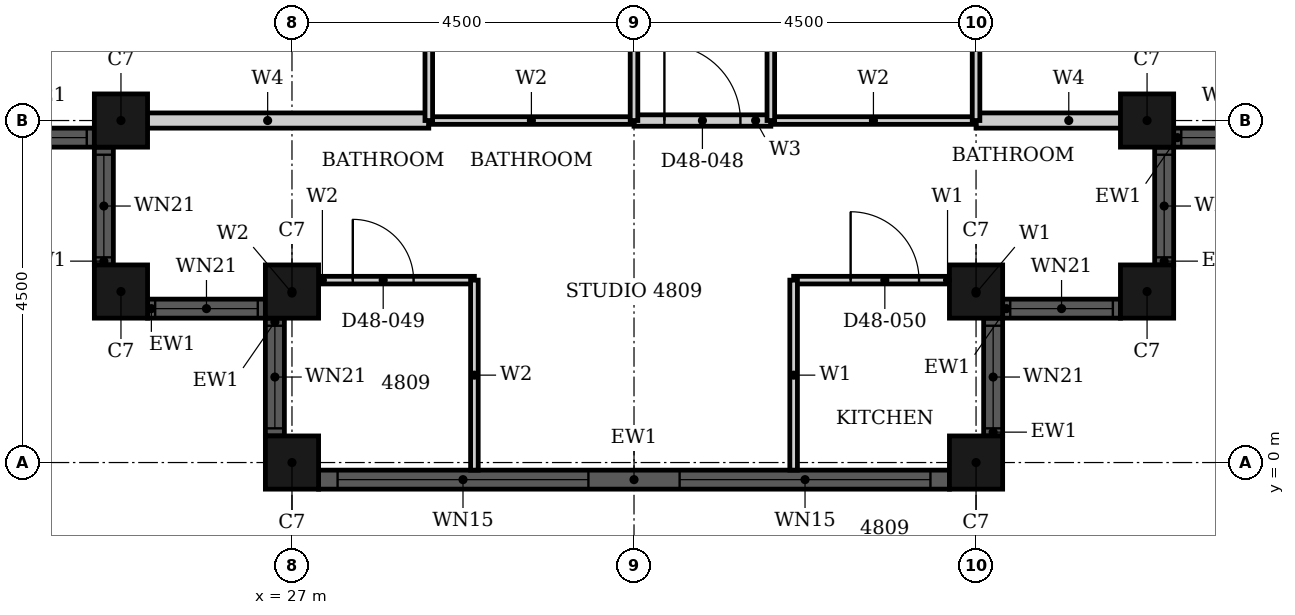
"""IFC4 building model, lengths in metres.
Left out: names, types, materials, properties, quantities, classifications, styles, units other than length and angle.
Written with IfcOpenShell. Run it as: python <this file> out.ifc"""

import sys

from ifc_helpers import new_model, si_unit, direction, frame, frame_2d, origin, origin_2d, place, context, subcontext, project, spatial, rectangle, hollow_rectangle, extrude, element, fill, save


model = new_model("IFC4")
c1 = context("Model", 3, precision=1e-05, world=origin(), true_north=direction((0.0, 1.0)))
c2 = subcontext(c1, "Body", "Model", "MODEL_VIEW")
j1 = project(units=[si_unit("LENGTHUNIT", "METRE"), si_unit("PLANEANGLEUNIT", "RADIAN")], contexts=[c1])
p1 = place(None, origin())
s1 = spatial("IfcSite", under=j1, at=p1, CompositionType="ELEMENT")
p2 = place(p1, origin())
s2 = spatial("IfcBuilding", under=s1, at=p2, CompositionType="ELEMENT")
p3 = place(p2, frame((0.0, 0.0, 192.4)))
s3 = spatial("IfcBuildingStorey", under=s2, at=p3, CompositionType="ELEMENT", Elevation=192.4)
for number, where, z_axis, x_axis in (
    (1, (24.75, 4.5, 0.0), (0.0, 0.0, 1.0), (1.0, 0.0, 0.0)),
    (2, (24.75, 2.25, 0.0), (0.0, 0.0, 1.0), (1.0, 0.0, 0.0)),
    (3, (27.0, 2.25, 0.0), (0.0, 0.0, 1.0), (1.0, 0.0, 0.0)),
    (4, (27.0, 0.0, 0.0), (0.0, 0.0, 1.0), (1.0, 0.0, 0.0)),
    (5, (36.0, 0.0, 0.0), (0.0, 0.0, 1.0), (1.0, 0.0, 0.0)),
    (6, (36.0, 2.25, 0.0), (0.0, 0.0, 1.0), (1.0, 0.0, 0.0)),
    (7, (38.25, 2.25, 0.0), (0.0, 0.0, 1.0), (1.0, 0.0, 0.0)),
    (8, (38.25, 4.5, 0.0), (0.0, 0.0, 1.0), (1.0, 0.0, 0.0)),
):
    element("IfcColumn", number, at=place(p3, frame(where, z_axis=z_axis, x_axis=x_axis)), inside=s3, PredefinedType="COLUMN", context=c2, shape_type="SweptSolid", body=[
        extrude(hollow_rectangle(XDim=0.7, YDim=0.7, WallThickness=0.022, at=origin_2d()), origin(), (0.0, 0.0, 1.0), 3.7),
    ])
p4 = place(p3, frame((22.85, 4.275, 0.0), z_axis=(0.0, 0.0, 1.0), x_axis=(1.0, 0.0, 0.0)))
e9 = element("IfcWall", 9, at=p4, inside=s3, PredefinedType="SOLIDWALL", context=c2, shape_type="SweptSolid", body=[
    extrude(rectangle(XDim=1.55, YDim=0.25, at=frame_2d((0.775, 0.0))), origin(), (0.0, 0.0, 1.0), 3.7),
])
p5 = place(p4, frame((0.1, 0.0, 0.9)))
e10 = element("IfcOpeningElement", 10, at=p5, cuts=e9, PredefinedType="OPENING", context=c2, shape_type="SweptSolid", body=[
    extrude(rectangle(XDim=1.35, YDim=1.85, at=frame_2d((0.675, 0.925))), frame((0.0, 0.135, 0.0), z_axis=(0.0, -1.0, 0.0), x_axis=(1.0, 0.0, 0.0)), (0.0, 0.0, 1.0), 0.27),
])
p6 = place(p3, frame((24.525, 4.15, 0.0), z_axis=(0.0, 0.0, 1.0), x_axis=(0.0, -1.0, 0.0)))
e11 = element("IfcWall", 11, at=p6, inside=s3, PredefinedType="SOLIDWALL", context=c2, shape_type="SweptSolid", body=[
    extrude(rectangle(XDim=1.55, YDim=0.25, at=frame_2d((0.775, 0.0))), origin(), (0.0, 0.0, 1.0), 3.7),
])
p7 = place(p6, frame((0.1, 0.0, 0.9)))
e12 = element("IfcOpeningElement", 12, at=p7, cuts=e11, PredefinedType="OPENING", context=c2, shape_type="SweptSolid", body=[
    extrude(rectangle(XDim=1.35, YDim=1.85, at=frame_2d((0.675, 0.925))), frame((0.0, 0.135, 0.0), z_axis=(0.0, -1.0, 0.0), x_axis=(1.0, 0.0, 0.0)), (0.0, 0.0, 1.0), 0.27),
])
p8 = place(p3, frame((25.1, 2.025, 0.0), z_axis=(0.0, 0.0, 1.0), x_axis=(1.0, 0.0, 0.0)))
e13 = element("IfcWall", 13, at=p8, inside=s3, PredefinedType="SOLIDWALL", context=c2, shape_type="SweptSolid", body=[
    extrude(rectangle(XDim=1.55, YDim=0.25, at=frame_2d((0.775, 0.0))), origin(), (0.0, 0.0, 1.0), 3.7),
])
p9 = place(p8, frame((0.1, 0.0, 0.9)))
e14 = element("IfcOpeningElement", 14, at=p9, cuts=e13, PredefinedType="OPENING", context=c2, shape_type="SweptSolid", body=[
    extrude(rectangle(XDim=1.35, YDim=1.85, at=frame_2d((0.675, 0.925))), frame((0.0, 0.135, 0.0), z_axis=(0.0, -1.0, 0.0), x_axis=(1.0, 0.0, 0.0)), (0.0, 0.0, 1.0), 0.27),
])
p10 = place(p3, frame((26.775, 1.9, 0.0), z_axis=(0.0, 0.0, 1.0), x_axis=(0.0, -1.0, 0.0)))
e15 = element("IfcWall", 15, at=p10, inside=s3, PredefinedType="SOLIDWALL", context=c2, shape_type="SweptSolid", body=[
    extrude(rectangle(XDim=1.55, YDim=0.25, at=frame_2d((0.775, 0.0))), origin(), (0.0, 0.0, 1.0), 3.7),
])
p11 = place(p10, frame((0.1, 0.0, 0.9)))
e16 = element("IfcOpeningElement", 16, at=p11, cuts=e15, PredefinedType="OPENING", context=c2, shape_type="SweptSolid", body=[
    extrude(rectangle(XDim=1.35, YDim=1.85, at=frame_2d((0.675, 0.925))), frame((0.0, 0.135, 0.0), z_axis=(0.0, -1.0, 0.0), x_axis=(1.0, 0.0, 0.0)), (0.0, 0.0, 1.0), 0.27),
])
p12 = place(p3, frame((27.35, -0.225, 0.0), z_axis=(0.0, 0.0, 1.0), x_axis=(1.0, 0.0, 0.0)))
e17 = element("IfcWall", 17, at=p12, inside=s3, PredefinedType="SOLIDWALL", context=c2, shape_type="SweptSolid", body=[
    extrude(rectangle(XDim=8.3, YDim=0.25, at=frame_2d((4.15, 0.0))), origin(), (0.0, 0.0, 1.0), 3.7),
])
p13 = place(p12, frame((0.25, 0.0, 0.45)))
e18 = element("IfcOpeningElement", 18, at=p13, cuts=e17, PredefinedType="OPENING", context=c2, shape_type="SweptSolid", body=[
    extrude(rectangle(XDim=3.3, YDim=2.3, at=frame_2d((1.65, 1.15))), frame((0.0, 0.135, 0.0), z_axis=(0.0, -1.0, 0.0), x_axis=(1.0, 0.0, 0.0)), (0.0, 0.0, 1.0), 0.27),
])
p14 = place(p12, frame((4.75, 0.0, 0.45)))
e19 = element("IfcOpeningElement", 19, at=p14, cuts=e17, PredefinedType="OPENING", context=c2, shape_type="SweptSolid", body=[
    extrude(rectangle(XDim=3.3, YDim=2.3, at=frame_2d((1.65, 1.15))), frame((0.0, 0.135, 0.0), z_axis=(0.0, -1.0, 0.0), x_axis=(1.0, 0.0, 0.0)), (0.0, 0.0, 1.0), 0.27),
])
p15 = place(p3, frame((36.225, 0.35, 0.0), z_axis=(0.0, 0.0, 1.0), x_axis=(0.0, 1.0, 0.0)))
e20 = element("IfcWall", 20, at=p15, inside=s3, PredefinedType="SOLIDWALL", context=c2, shape_type="SweptSolid", body=[
    extrude(rectangle(XDim=1.55, YDim=0.25, at=frame_2d((0.775, 0.0))), origin(), (0.0, 0.0, 1.0), 3.7),
])
p16 = place(p15, frame((0.1, 0.0, 0.9)))
e21 = element("IfcOpeningElement", 21, at=p16, cuts=e20, PredefinedType="OPENING", context=c2, shape_type="SweptSolid", body=[
    extrude(rectangle(XDim=1.35, YDim=1.85, at=frame_2d((0.675, 0.925))), frame((0.0, 0.135, 0.0), z_axis=(0.0, -1.0, 0.0), x_axis=(1.0, 0.0, 0.0)), (0.0, 0.0, 1.0), 0.27),
])
p17 = place(p3, frame((36.35, 2.025, 0.0), z_axis=(0.0, 0.0, 1.0), x_axis=(1.0, 0.0, 0.0)))
e22 = element("IfcWall", 22, at=p17, inside=s3, PredefinedType="SOLIDWALL", context=c2, shape_type="SweptSolid", body=[
    extrude(rectangle(XDim=1.55, YDim=0.25, at=frame_2d((0.775, 0.0))), origin(), (0.0, 0.0, 1.0), 3.7),
])
p18 = place(p17, frame((0.1, 0.0, 0.9)))
e23 = element("IfcOpeningElement", 23, at=p18, cuts=e22, PredefinedType="OPENING", context=c2, shape_type="SweptSolid", body=[
    extrude(rectangle(XDim=1.35, YDim=1.85, at=frame_2d((0.675, 0.925))), frame((0.0, 0.135, 0.0), z_axis=(0.0, -1.0, 0.0), x_axis=(1.0, 0.0, 0.0)), (0.0, 0.0, 1.0), 0.27),
])
p19 = place(p3, frame((38.475, 2.6, 0.0), z_axis=(0.0, 0.0, 1.0), x_axis=(0.0, 1.0, 0.0)))
e24 = element("IfcWall", 24, at=p19, inside=s3, PredefinedType="SOLIDWALL", context=c2, shape_type="SweptSolid", body=[
    extrude(rectangle(XDim=1.55, YDim=0.25, at=frame_2d((0.775, 0.0))), origin(), (0.0, 0.0, 1.0), 3.7),
])
p20 = place(p19, frame((0.1, 0.0, 0.9)))
e25 = element("IfcOpeningElement", 25, at=p20, cuts=e24, PredefinedType="OPENING", context=c2, shape_type="SweptSolid", body=[
    extrude(rectangle(XDim=1.35, YDim=1.85, at=frame_2d((0.675, 0.925))), frame((0.0, 0.135, 0.0), z_axis=(0.0, -1.0, 0.0), x_axis=(1.0, 0.0, 0.0)), (0.0, 0.0, 1.0), 0.27),
])
p21 = place(p3, frame((38.6, 4.275, 0.0), z_axis=(0.0, 0.0, 1.0), x_axis=(1.0, 0.0, 0.0)))
e26 = element("IfcWall", 26, at=p21, inside=s3, PredefinedType="SOLIDWALL", context=c2, shape_type="SweptSolid", body=[
    extrude(rectangle(XDim=1.55, YDim=0.25, at=frame_2d((0.775, 0.0))), origin(), (0.0, 0.0, 1.0), 3.7),
])
p22 = place(p21, frame((0.1, 0.0, 0.9)))
e27 = element("IfcOpeningElement", 27, at=p22, cuts=e26, PredefinedType="OPENING", context=c2, shape_type="SweptSolid", body=[
    extrude(rectangle(XDim=1.35, YDim=1.85, at=frame_2d((0.675, 0.925))), frame((0.0, 0.135, 0.0), z_axis=(0.0, -1.0, 0.0), x_axis=(1.0, 0.0, 0.0)), (0.0, 0.0, 1.0), 0.27),
])
p23 = place(p3, frame((31.5, 4.5, 0.0), z_axis=(0.0, 0.0, 1.0), x_axis=(1.0, 0.0, 0.0)))
e28 = element("IfcWall", 28, at=p23, inside=s3, PredefinedType="PARTITIONING", context=c2, shape_type="SweptSolid", body=[
    extrude(rectangle(XDim=1.8, YDim=0.15, at=frame_2d((0.9, 0.0))), origin(), (0.0, 0.0, 1.0), 3.4),
])
p24 = place(p23, frame((0.4, 0.0, 0.0)))
e29 = element("IfcOpeningElement", 29, at=p24, cuts=e28, PredefinedType="OPENING", context=c2, shape_type="SweptSolid", body=[
    extrude(rectangle(XDim=1.0, YDim=2.2, at=frame_2d((0.5, 1.1))), frame((0.0, 0.085, 0.0), z_axis=(0.0, -1.0, 0.0), x_axis=(1.0, 0.0, 0.0)), (0.0, 0.0, 1.0), 0.17),
])
p25 = place(p3, frame((33.6, 2.4, 0.0), z_axis=(0.0, 0.0, 1.0), x_axis=(1.0, 0.0, 0.0)))
e30 = element("IfcWall", 30, at=p25, inside=s3, PredefinedType="PARTITIONING", context=c2, shape_type="SweptSolid", body=[
    extrude(rectangle(XDim=2.4, YDim=0.1, at=frame_2d((1.2, 0.0))), origin(), (0.0, 0.0, 1.0), 3.4),
])
p26 = place(p25, frame((0.75, 0.0, 0.0)))
e31 = element("IfcOpeningElement", 31, at=p26, cuts=e30, PredefinedType="OPENING", context=c2, shape_type="SweptSolid", body=[
    extrude(rectangle(XDim=0.9, YDim=2.1, at=frame_2d((0.45, 1.05))), frame((0.0, 0.06, 0.0), z_axis=(0.0, -1.0, 0.0), x_axis=(1.0, 0.0, 0.0)), (0.0, 0.0, 1.0), 0.12),
])
p27 = place(p3, frame((33.6, -0.1, 0.0), z_axis=(0.0, 0.0, 1.0), x_axis=(0.0, 1.0, 0.0)))
e32 = element("IfcWall", 32, at=p27, inside=s3, PredefinedType="PARTITIONING", context=c2, shape_type="SweptSolid", body=[
    extrude(rectangle(XDim=2.5, YDim=0.1, at=frame_2d((1.25, 0.0))), origin(), (0.0, 0.0, 1.0), 3.4),
])
p28 = place(p3, frame((36.0, 2.06, 0.0), z_axis=(0.0, 0.0, 1.0), x_axis=(0.0, 1.0, 0.0)))
e33 = element("IfcWall", 33, at=p28, inside=s3, PredefinedType="PARTITIONING", context=c2, shape_type="SweptSolid", body=[
    extrude(rectangle(XDim=0.34, YDim=0.1, at=frame_2d((0.17, 0.0))), origin(), (0.0, 0.0, 1.0), 3.4),
])
p29 = place(p3, frame((36.0, 4.5, 0.0), z_axis=(0.0, 0.0, 1.0), x_axis=(1.0, 0.0, 0.0)))
e34 = element("IfcWall", 34, at=p29, inside=s3, PredefinedType="PARTITIONING", context=c2, shape_type="SweptSolid", body=[
    extrude(rectangle(XDim=2.44, YDim=0.2, at=frame_2d((1.22, 0.0))), origin(), (0.0, 0.0, 1.0), 3.4),
])
p30 = place(p3, frame((24.56, 4.5, 0.0), z_axis=(0.0, 0.0, 1.0), x_axis=(1.0, 0.0, 0.0)))
e35 = element("IfcWall", 35, at=p30, inside=s3, PredefinedType="PARTITIONING", context=c2, shape_type="SweptSolid", body=[
    extrude(rectangle(XDim=4.24, YDim=0.2, at=frame_2d((2.12, 0.0))), origin(), (0.0, 0.0, 1.0), 3.4),
])
p31 = place(p3, frame((27.0, 2.4, 0.0), z_axis=(0.0, 0.0, 1.0), x_axis=(1.0, 0.0, 0.0)))
e36 = element("IfcWall", 36, at=p31, inside=s3, PredefinedType="PARTITIONING", context=c2, shape_type="SweptSolid", body=[
    extrude(rectangle(XDim=2.4, YDim=0.1, at=frame_2d((1.2, 0.0))), origin(), (0.0, 0.0, 1.0), 3.4),
])
p32 = place(p31, frame((0.8, 0.0, 0.0)))
e37 = element("IfcOpeningElement", 37, at=p32, cuts=e36, PredefinedType="OPENING", context=c2, shape_type="SweptSolid", body=[
    extrude(rectangle(XDim=0.8, YDim=2.1, at=frame_2d((0.4, 1.05))), frame((0.0, 0.06, 0.0), z_axis=(0.0, -1.0, 0.0), x_axis=(1.0, 0.0, 0.0)), (0.0, 0.0, 1.0), 0.12),
])
for number, where, z_axis, x_axis in (
    (38, (33.3, 4.5, 0.0), (0.0, 0.0, 1.0), (1.0, 0.0, 0.0)),
    (39, (28.8, 4.5, 0.0), (0.0, 0.0, 1.0), (1.0, 0.0, 0.0)),
):
    element("IfcWall", number, at=place(p3, frame(where, z_axis=z_axis, x_axis=x_axis)), inside=s3, PredefinedType="PARTITIONING", context=c2, shape_type="SweptSolid", body=[
        extrude(rectangle(XDim=2.7, YDim=0.1, at=frame_2d((1.35, 0.0))), origin(), (0.0, 0.0, 1.0), 3.4),
    ])
p33 = place(p3, frame((27.0, 2.06, 0.0), z_axis=(0.0, 0.0, 1.0), x_axis=(0.0, 1.0, 0.0)))
e40 = element("IfcWall", 40, at=p33, inside=s3, PredefinedType="PARTITIONING", context=c2, shape_type="SweptSolid", body=[
    extrude(rectangle(XDim=0.34, YDim=0.1, at=frame_2d((0.17, 0.0))), origin(), (0.0, 0.0, 1.0), 3.4),
])
p34 = place(p3, frame((28.8, 4.5, 0.0), z_axis=(0.0, 0.0, 1.0), x_axis=(0.0, 1.0, 0.0)))
e41 = element("IfcWall", 41, at=p34, inside=s3, PredefinedType="PARTITIONING", context=c2, shape_type="SweptSolid", body=[
    extrude(rectangle(XDim=2.4, YDim=0.1, at=frame_2d((1.2, 0.0))), origin(), (0.0, 0.0, 1.0), 3.4),
])
p35 = place(p3, frame((29.4, -0.1, 0.0), z_axis=(0.0, 0.0, 1.0), x_axis=(0.0, 1.0, 0.0)))
e42 = element("IfcWall", 42, at=p35, inside=s3, PredefinedType="PARTITIONING", context=c2, shape_type="SweptSolid", body=[
    extrude(rectangle(XDim=2.5, YDim=0.1, at=frame_2d((1.25, 0.0))), origin(), (0.0, 0.0, 1.0), 3.4),
])
p36 = place(p3, frame((31.5, 4.5, 0.0), z_axis=(0.0, 0.0, 1.0), x_axis=(0.0, 1.0, 0.0)))
e43 = element("IfcWall", 43, at=p36, inside=s3, PredefinedType="PARTITIONING", context=c2, shape_type="SweptSolid", body=[
    extrude(rectangle(XDim=2.4, YDim=0.1, at=frame_2d((1.2, 0.0))), origin(), (0.0, 0.0, 1.0), 2.68),
])
p37 = place(p3, frame((33.3, 4.5, 0.0), z_axis=(0.0, 0.0, 1.0), x_axis=(0.0, 1.0, 0.0)))
e44 = element("IfcWall", 44, at=p37, inside=s3, PredefinedType="PARTITIONING", context=c2, shape_type="SweptSolid", body=[
    extrude(rectangle(XDim=2.4, YDim=0.1, at=frame_2d((1.2, 0.0))), origin(), (0.0, 0.0, 1.0), 3.4),
])
p38 = place(p3, frame((36.0, 4.5, 0.0), z_axis=(0.0, 0.0, 1.0), x_axis=(0.0, 1.0, 0.0)))
e45 = element("IfcWall", 45, at=p38, inside=s3, PredefinedType="PARTITIONING", context=c2, shape_type="SweptSolid", body=[
    extrude(rectangle(XDim=2.4, YDim=0.1, at=frame_2d((1.2, 0.0))), origin(), (0.0, 0.0, 1.0), 2.68),
])
p39 = place(p5, origin())
e46 = element("IfcWindow", 46, at=p39, inside=s3, PartitioningType="SINGLE_PANEL", PredefinedType="WINDOW", context=c2, shape_type="SweptSolid", body=[
    extrude(rectangle(XDim=1.35, YDim=1.85, at=frame_2d((0.675, 0.925))), frame((0.0, 0.03, 0.0), z_axis=(0.0, -1.0, 0.0), x_axis=(1.0, 0.0, 0.0)), (0.0, 0.0, 1.0), 0.06),
])
fill(e10, e46)
p40 = place(p7, origin())
e47 = element("IfcWindow", 47, at=p40, inside=s3, PartitioningType="SINGLE_PANEL", PredefinedType="WINDOW", context=c2, shape_type="SweptSolid", body=[
    extrude(rectangle(XDim=1.35, YDim=1.85, at=frame_2d((0.675, 0.925))), frame((0.0, 0.03, 0.0), z_axis=(0.0, -1.0, 0.0), x_axis=(1.0, 0.0, 0.0)), (0.0, 0.0, 1.0), 0.06),
])
fill(e12, e47)
p41 = place(p9, origin())
e48 = element("IfcWindow", 48, at=p41, inside=s3, PartitioningType="SINGLE_PANEL", PredefinedType="WINDOW", context=c2, shape_type="SweptSolid", body=[
    extrude(rectangle(XDim=1.35, YDim=1.85, at=frame_2d((0.675, 0.925))), frame((0.0, 0.03, 0.0), z_axis=(0.0, -1.0, 0.0), x_axis=(1.0, 0.0, 0.0)), (0.0, 0.0, 1.0), 0.06),
])
fill(e14, e48)
p42 = place(p11, origin())
e49 = element("IfcWindow", 49, at=p42, inside=s3, PartitioningType="SINGLE_PANEL", PredefinedType="WINDOW", context=c2, shape_type="SweptSolid", body=[
    extrude(rectangle(XDim=1.35, YDim=1.85, at=frame_2d((0.675, 0.925))), frame((0.0, 0.03, 0.0), z_axis=(0.0, -1.0, 0.0), x_axis=(1.0, 0.0, 0.0)), (0.0, 0.0, 1.0), 0.06),
])
fill(e16, e49)
p43 = place(p13, origin())
e50 = element("IfcWindow", 50, at=p43, inside=s3, PartitioningType="SINGLE_PANEL", PredefinedType="WINDOW", context=c2, shape_type="SweptSolid", body=[
    extrude(rectangle(XDim=3.3, YDim=2.3, at=frame_2d((1.65, 1.15))), frame((0.0, 0.03, 0.0), z_axis=(0.0, -1.0, 0.0), x_axis=(1.0, 0.0, 0.0)), (0.0, 0.0, 1.0), 0.06),
])
fill(e18, e50)
p44 = place(p14, origin())
e51 = element("IfcWindow", 51, at=p44, inside=s3, PartitioningType="SINGLE_PANEL", PredefinedType="WINDOW", context=c2, shape_type="SweptSolid", body=[
    extrude(rectangle(XDim=3.3, YDim=2.3, at=frame_2d((1.65, 1.15))), frame((0.0, 0.03, 0.0), z_axis=(0.0, -1.0, 0.0), x_axis=(1.0, 0.0, 0.0)), (0.0, 0.0, 1.0), 0.06),
])
fill(e19, e51)
p45 = place(p16, origin())
e52 = element("IfcWindow", 52, at=p45, inside=s3, PartitioningType="SINGLE_PANEL", PredefinedType="WINDOW", context=c2, shape_type="SweptSolid", body=[
    extrude(rectangle(XDim=1.35, YDim=1.85, at=frame_2d((0.675, 0.925))), frame((0.0, 0.03, 0.0), z_axis=(0.0, -1.0, 0.0), x_axis=(1.0, 0.0, 0.0)), (0.0, 0.0, 1.0), 0.06),
])
fill(e21, e52)
p46 = place(p18, origin())
e53 = element("IfcWindow", 53, at=p46, inside=s3, PartitioningType="SINGLE_PANEL", PredefinedType="WINDOW", context=c2, shape_type="SweptSolid", body=[
    extrude(rectangle(XDim=1.35, YDim=1.85, at=frame_2d((0.675, 0.925))), frame((0.0, 0.03, 0.0), z_axis=(0.0, -1.0, 0.0), x_axis=(1.0, 0.0, 0.0)), (0.0, 0.0, 1.0), 0.06),
])
fill(e23, e53)
p47 = place(p20, origin())
e54 = element("IfcWindow", 54, at=p47, inside=s3, PartitioningType="SINGLE_PANEL", PredefinedType="WINDOW", context=c2, shape_type="SweptSolid", body=[
    extrude(rectangle(XDim=1.35, YDim=1.85, at=frame_2d((0.675, 0.925))), frame((0.0, 0.03, 0.0), z_axis=(0.0, -1.0, 0.0), x_axis=(1.0, 0.0, 0.0)), (0.0, 0.0, 1.0), 0.06),
])
fill(e25, e54)
p48 = place(p22, origin())
e55 = element("IfcWindow", 55, at=p48, inside=s3, PartitioningType="SINGLE_PANEL", PredefinedType="WINDOW", context=c2, shape_type="SweptSolid", body=[
    extrude(rectangle(XDim=1.35, YDim=1.85, at=frame_2d((0.675, 0.925))), frame((0.0, 0.03, 0.0), z_axis=(0.0, -1.0, 0.0), x_axis=(1.0, 0.0, 0.0)), (0.0, 0.0, 1.0), 0.06),
])
fill(e27, e55)
p49 = place(p24, origin())
e56 = element("IfcDoor", 56, at=p49, inside=s3, OperationType="SINGLE_SWING_RIGHT", PredefinedType="DOOR", context=c2, shape_type="SweptSolid", body=[
    extrude(rectangle(XDim=1.0, YDim=2.2, at=frame_2d((0.5, 1.1))), frame((0.0, 0.025, 0.0), z_axis=(0.0, -1.0, 0.0), x_axis=(1.0, 0.0, 0.0)), (0.0, 0.0, 1.0), 0.05),
])
fill(e29, e56)
p50 = place(p32, origin())
e57 = element("IfcDoor", 57, at=p50, inside=s3, OperationType="SINGLE_SWING_RIGHT", PredefinedType="DOOR", context=c2, shape_type="SweptSolid", body=[
    extrude(rectangle(XDim=0.8, YDim=2.1, at=frame_2d((0.4, 1.05))), frame((0.0, 0.025, 0.0), z_axis=(0.0, -1.0, 0.0), x_axis=(1.0, 0.0, 0.0)), (0.0, 0.0, 1.0), 0.05),
])
fill(e37, e57)
p51 = place(p26, origin())
e58 = element("IfcDoor", 58, at=p51, inside=s3, OperationType="SINGLE_SWING_RIGHT", PredefinedType="DOOR", context=c2, shape_type="SweptSolid", body=[
    extrude(rectangle(XDim=0.9, YDim=2.1, at=frame_2d((0.45, 1.05))), frame((0.0, 0.025, 0.0), z_axis=(0.0, -1.0, 0.0), x_axis=(1.0, 0.0, 0.0)), (0.0, 0.0, 1.0), 0.05),
])
fill(e31, e58)
save(model, sys.argv[1])
